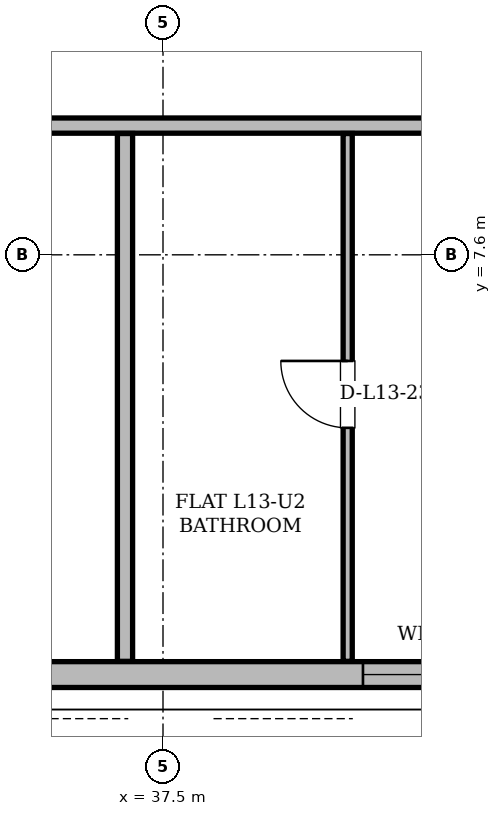
"""IFC4 building model, lengths in metres.
Left out: names, types, materials, properties, quantities, classifications, styles, units other than length and angle.
Written with IfcOpenShell. Run it as: python <this file> out.ifc"""

import sys

from ifc_helpers import new_model, si_unit, direction, frame, frame_2d, origin, place, context, subcontext, project, spatial, rectangle, extrude, element, fill, save


model = new_model("IFC4")
c1 = context("Model", 3, precision=1e-05, world=origin(), true_north=direction((0.0, 1.0)))
c2 = subcontext(c1, "Body", "Model", "MODEL_VIEW")
j1 = project(units=[si_unit("LENGTHUNIT", "METRE"), si_unit("PLANEANGLEUNIT", "RADIAN")], contexts=[c1])
p1 = place(None, origin())
s1 = spatial("IfcSite", under=j1, at=p1, CompositionType="ELEMENT")
p2 = place(p1, origin())
s2 = spatial("IfcBuilding", under=s1, at=p2, CompositionType="ELEMENT")
p3 = place(p2, frame((0.0, 0.0, 52.5)))
s3 = spatial("IfcBuildingStorey", under=s2, at=p3, CompositionType="ELEMENT", Elevation=52.5)
p4 = place(p3, frame((20.799, 2.078, 0.0), z_axis=(0.0, 0.0, 1.0), x_axis=(1.0, 0.0, 0.0)))
e1 = element("IfcWall", 1, at=p4, inside=s3, PredefinedType="SOLIDWALL", context=c2, shape_type="SweptSolid", body=[
    extrude(rectangle(XDim=33.402, YDim=0.34, at=frame_2d((16.701, 0.0))), origin(), (0.0, 0.0, 1.0), 2.494),
])
p5 = place(p4, frame((7.615, 0.0, 0.0)))
e2 = element("IfcOpeningElement", 2, at=p5, cuts=e1, PredefinedType="OPENING", context=c2, shape_type="SweptSolid", body=[
    extrude(rectangle(XDim=1.5, YDim=2.2, at=frame_2d((0.75, 1.1))), frame((0.0, 0.17, 0.0), z_axis=(0.0, -1.0, 0.0), x_axis=(1.0, 0.0, 0.0)), (0.0, 0.0, 1.0), 0.34),
])
p6 = place(p4, frame((25.323, 0.0, 0.0)))
e3 = element("IfcOpeningElement", 3, at=p6, cuts=e1, PredefinedType="OPENING", context=c2, shape_type="SweptSolid", body=[
    extrude(rectangle(XDim=1.5, YDim=2.2, at=frame_2d((0.75, 1.1))), frame((0.0, 0.17, 0.0), z_axis=(0.0, -1.0, 0.0), x_axis=(1.0, 0.0, 0.0)), (0.0, 0.0, 1.0), 0.34),
])
p7 = place(p4, frame((1.988, 0.0, 0.85)))
e4 = element("IfcOpeningElement", 4, at=p7, cuts=e1, PredefinedType="OPENING", context=c2, shape_type="SweptSolid", body=[
    extrude(rectangle(XDim=2.2, YDim=1.534, at=frame_2d((1.1, 0.767))), frame((0.0, 0.17, 0.0), z_axis=(0.0, -1.0, 0.0), x_axis=(1.0, 0.0, 0.0)), (0.0, 0.0, 1.0), 0.34),
])
p8 = place(p4, frame((12.577, 0.0, 0.85)))
e5 = element("IfcOpeningElement", 5, at=p8, cuts=e1, PredefinedType="OPENING", context=c2, shape_type="SweptSolid", body=[
    extrude(rectangle(XDim=1.6, YDim=1.534, at=frame_2d((0.8, 0.767))), frame((0.0, 0.17, 0.0), z_axis=(0.0, -1.0, 0.0), x_axis=(1.0, 0.0, 0.0)), (0.0, 0.0, 1.0), 0.34),
])
p9 = place(p4, frame((19.332, 0.0, 0.85)))
e6 = element("IfcOpeningElement", 6, at=p9, cuts=e1, PredefinedType="OPENING", context=c2, shape_type="SweptSolid", body=[
    extrude(rectangle(XDim=1.8, YDim=1.534, at=frame_2d((0.9, 0.767))), frame((0.0, 0.17, 0.0), z_axis=(0.0, -1.0, 0.0), x_axis=(1.0, 0.0, 0.0)), (0.0, 0.0, 1.0), 0.34),
])
p10 = place(p4, frame((30.039, 0.0, 0.85)))
e7 = element("IfcOpeningElement", 7, at=p10, cuts=e1, PredefinedType="OPENING", context=c2, shape_type="SweptSolid", body=[
    extrude(rectangle(XDim=2.2, YDim=1.534, at=frame_2d((1.1, 0.767))), frame((0.0, 0.17, 0.0), z_axis=(0.0, -1.0, 0.0), x_axis=(1.0, 0.0, 0.0)), (0.0, 0.0, 1.0), 0.34),
])
p11 = place(p3, frame((19.2, 9.3, 0.0), z_axis=(0.0, 0.0, 1.0), x_axis=(1.0, 0.0, 0.0)))
e8 = element("IfcWall", 8, at=p11, inside=s3, PredefinedType="PARTITIONING", context=c2, shape_type="SweptSolid", body=[
    extrude(rectangle(XDim=36.6, YDim=0.2, at=frame_2d((18.3, 0.0))), origin(), (0.0, 0.0, 1.0), 2.738),
])
p12 = place(p11, frame((8.531, 0.0, 0.0)))
e9 = element("IfcOpeningElement", 9, at=p12, cuts=e8, PredefinedType="OPENING", context=c2, shape_type="SweptSolid", body=[
    extrude(rectangle(XDim=1.0, YDim=2.18, at=frame_2d((0.5, 1.09))), frame((0.0, 0.1, 0.0), z_axis=(0.0, -1.0, 0.0), x_axis=(1.0, 0.0, 0.0)), (0.0, 0.0, 1.0), 0.2),
])
p13 = place(p11, frame((24.062, 0.0, 0.0)))
e10 = element("IfcOpeningElement", 10, at=p13, cuts=e8, PredefinedType="OPENING", context=c2, shape_type="SweptSolid", body=[
    extrude(rectangle(XDim=1.0, YDim=2.18, at=frame_2d((0.5, 1.09))), frame((0.0, 0.1, 0.0), z_axis=(0.0, -1.0, 0.0), x_axis=(1.0, 0.0, 0.0)), (0.0, 0.0, 1.0), 0.2),
])
p14 = place(p11, frame((31.904, 0.0, 0.0)))
e11 = element("IfcOpeningElement", 11, at=p14, cuts=e8, PredefinedType="OPENING", context=c2, shape_type="SweptSolid", body=[
    extrude(rectangle(XDim=1.0, YDim=2.18, at=frame_2d((0.5, 1.09))), frame((0.0, 0.1, 0.0), z_axis=(0.0, -1.0, 0.0), x_axis=(1.0, 0.0, 0.0)), (0.0, 0.0, 1.0), 0.2),
])
p15 = place(p3, frame((37.0, 2.252, 0.0), z_axis=(0.0, 0.0, 1.0), x_axis=(0.0, 1.0, 0.0)))
e12 = element("IfcWall", 12, at=p15, inside=s3, PredefinedType="PARTITIONING", context=c2, shape_type="SweptSolid", body=[
    extrude(rectangle(XDim=6.944, YDim=0.2, at=frame_2d((3.472, 0.0))), origin(), (0.0, 0.0, 1.0), 3.36),
])
p16 = place(p3, frame((39.93, 2.252, 0.0), z_axis=(0.0, 0.0, 1.0), x_axis=(0.0, 1.0, 0.0)))
e13 = element("IfcWall", 13, at=p16, inside=s3, PredefinedType="PARTITIONING", context=c2, shape_type="SweptSolid", body=[
    extrude(rectangle(XDim=6.944, YDim=0.12, at=frame_2d((3.472, 0.0))), origin(), (0.0, 0.0, 1.0), 3.36),
])
p17 = place(p16, frame((3.072, 0.0, 0.0)))
e14 = element("IfcOpeningElement", 14, at=p17, cuts=e13, PredefinedType="OPENING", context=c2, shape_type="SweptSolid", body=[
    extrude(rectangle(XDim=0.88, YDim=2.08, at=frame_2d((0.44, 1.04))), frame((0.0, 0.06, 0.0), z_axis=(0.0, -1.0, 0.0), x_axis=(1.0, 0.0, 0.0)), (0.0, 0.0, 1.0), 0.12),
])
p18 = place(p9, origin())
e15 = element("IfcWindow", 15, at=p18, inside=s3, PartitioningType="SINGLE_PANEL", PredefinedType="WINDOW", context=c2, shape_type="SweptSolid", body=[
    extrude(rectangle(XDim=1.8, YDim=1.534, at=frame_2d((0.9, 0.767))), frame((0.0, 0.03, 0.0), z_axis=(0.0, -1.0, 0.0), x_axis=(1.0, 0.0, 0.0)), (0.0, 0.0, 1.0), 0.06),
])
fill(e6, e15)
p19 = place(p17, origin())
e16 = element("IfcDoor", 16, at=p19, inside=s3, OperationType="SINGLE_SWING_RIGHT", PredefinedType="DOOR", context=c2, shape_type="SweptSolid", body=[
    extrude(rectangle(XDim=0.88, YDim=2.08, at=frame_2d((0.44, 1.04))), frame((0.0, 0.025, 0.0), z_axis=(0.0, -1.0, 0.0), x_axis=(1.0, 0.0, 0.0)), (0.0, 0.0, 1.0), 0.05),
])
fill(e14, e16)
save(model, sys.argv[1])
